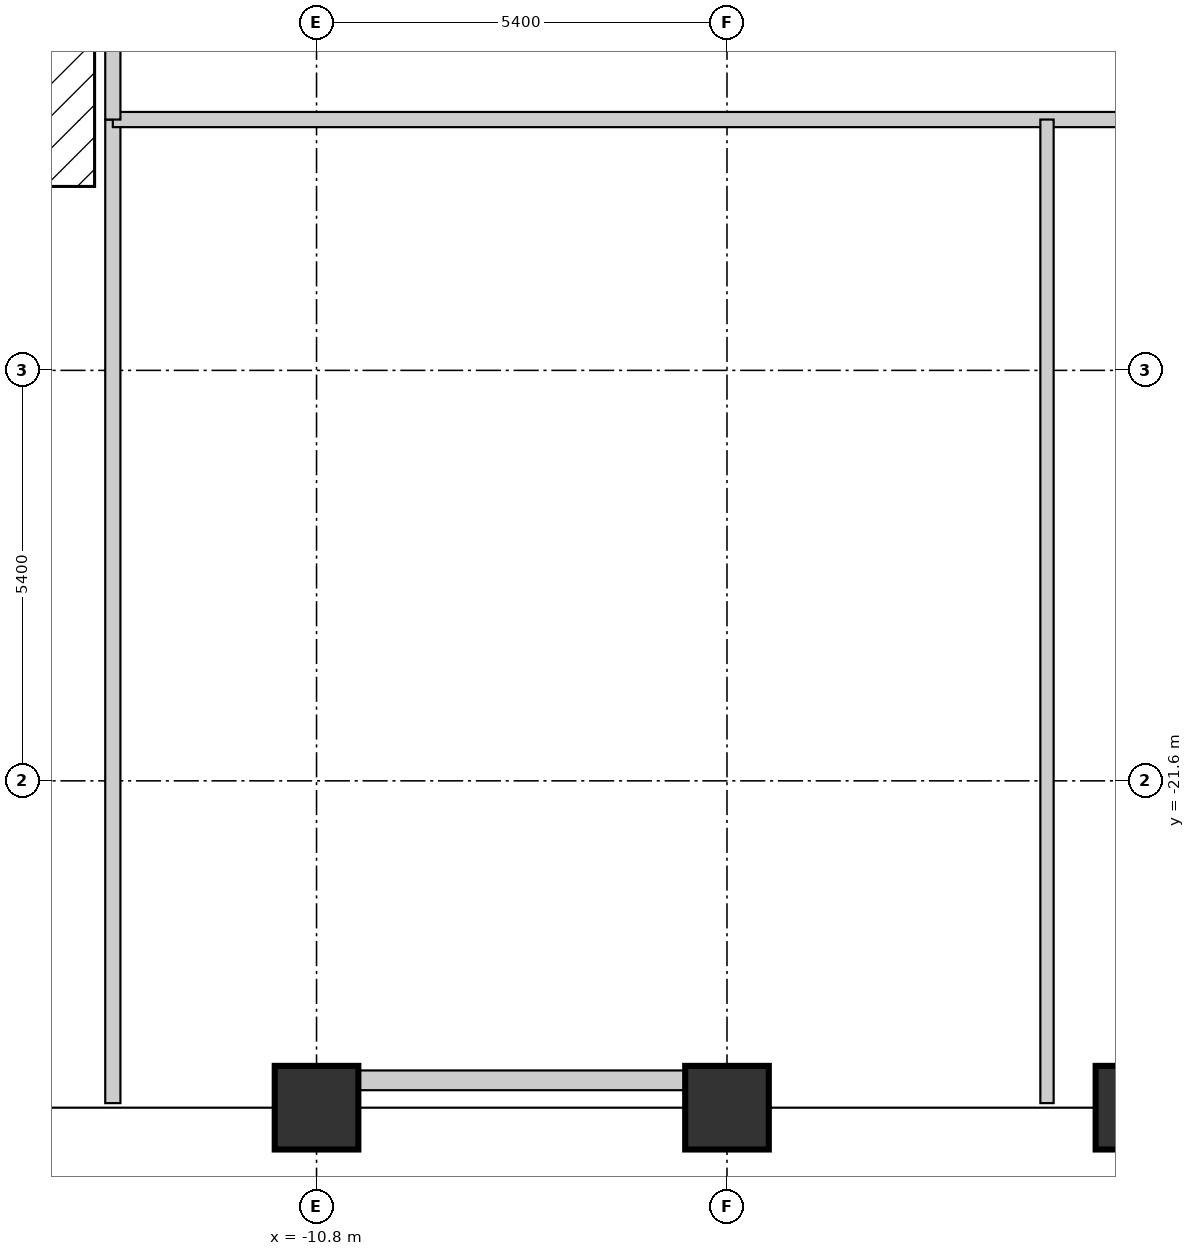
"""IFC4 building model, lengths in metres.
Left out: names, types, materials, properties, quantities, classifications, styles, units other than length and angle.
Written with IfcOpenShell. Run it as: python <this file> out.ifc"""

import sys

from ifc_helpers import new_model, si_unit, direction, frame, frame_2d, origin, origin_2d, place, context, subcontext, project, spatial, rectangle, extrude, element, fill, save


model = new_model("IFC4")
c1 = context("Model", 3, precision=1e-05, world=origin(), true_north=direction((0.0, 1.0)))
c2 = subcontext(c1, "Body", "Model", "MODEL_VIEW")
j1 = project(units=[si_unit("LENGTHUNIT", "METRE"), si_unit("PLANEANGLEUNIT", "RADIAN")], contexts=[c1])
p1 = place(None, origin())
s1 = spatial("IfcSite", under=j1, at=p1, CompositionType="ELEMENT")
p2 = place(p1, origin())
s2 = spatial("IfcBuilding", under=s1, at=p2, CompositionType="ELEMENT")
p3 = place(p2, frame((0.0, 0.0, 83.25)))
s3 = spatial("IfcBuildingStorey", under=s2, at=p3, CompositionType="ELEMENT", Elevation=83.25)
for number, where, z_axis, x_axis in (
    (1, (-10.8, -25.9, 0.0), (0.0, 0.0, 1.0), (1.0, 0.0, 0.0)),
    (2, (-5.4, -25.9, 0.0), (0.0, 0.0, 1.0), (1.0, 0.0, 0.0)),
    (3, (0.0, -25.9, 0.0), (0.0, 0.0, 1.0), (1.0, 0.0, 0.0)),
):
    element("IfcColumn", number, at=place(p3, frame(where, z_axis=z_axis, x_axis=x_axis)), inside=s3, PredefinedType="COLUMN", context=c2, shape_type="SweptSolid", body=[
        extrude(rectangle(XDim=1.1, YDim=1.1, at=origin_2d()), origin(), (0.0, 0.0, 1.0), 3.75),
    ])
p4 = place(p3, frame((-10.252, -25.54, 0.0), z_axis=(0.0, 0.0, 1.0), x_axis=(1.0, 0.0, 0.0)))
e4 = element("IfcWall", 4, at=p4, inside=s3, PredefinedType="STANDARD", context=c2, shape_type="SweptSolid", body=[
    extrude(rectangle(XDim=4.304, YDim=0.26, at=frame_2d((2.152, 0.0))), origin(), (0.0, 0.0, 1.0), 2.699),
])
p5 = place(p3, frame((-13.48, -25.84, 0.0), z_axis=(0.0, 0.0, 1.0), x_axis=(0.0, 1.0, 0.0)))
e5 = element("IfcWall", 5, at=p5, inside=s3, PredefinedType="PARTITIONING", context=c2, shape_type="SweptSolid", body=[
    extrude(rectangle(XDim=12.94, YDim=0.2, at=frame_2d((6.47, 0.0))), origin(), (0.0, 0.0, 1.0), 2.699),
])
p6 = place(p3, frame((-13.48, -12.9, 0.0), z_axis=(0.0, 0.0, 1.0), x_axis=(1.0, 0.0, 0.0)))
e6 = element("IfcWall", 6, at=p6, inside=s3, PredefinedType="PARTITIONING", context=c2, shape_type="SweptSolid", body=[
    extrude(rectangle(XDim=24.58, YDim=0.2, at=frame_2d((12.29, 0.0))), origin(), (0.0, 0.0, 1.0), 2.933),
])
p7 = place(p6, frame((5.695, 0.0, 0.0)))
e7 = element("IfcOpeningElement", 7, at=p7, cuts=e6, PredefinedType="OPENING", context=c2, shape_type="SweptSolid", body=[
    extrude(rectangle(XDim=0.85, YDim=2.1, at=frame_2d((0.425, 1.05))), frame((0.0, 0.11, 0.0), z_axis=(0.0, -1.0, 0.0), x_axis=(1.0, 0.0, 0.0)), (0.0, 0.0, 1.0), 0.22),
])
p8 = place(p6, frame((15.794, 0.0, 0.0)))
e8 = element("IfcOpeningElement", 8, at=p8, cuts=e6, PredefinedType="OPENING", context=c2, shape_type="SweptSolid", body=[
    extrude(rectangle(XDim=0.85, YDim=2.1, at=frame_2d((0.425, 1.05))), frame((0.0, 0.11, 0.0), z_axis=(0.0, -1.0, 0.0), x_axis=(1.0, 0.0, 0.0)), (0.0, 0.0, 1.0), 0.22),
])
p9 = place(p3, frame((-13.48, -12.9, 0.0), z_axis=(0.0, 0.0, 1.0), x_axis=(0.0, 1.0, 0.0)))
e9 = element("IfcWall", 9, at=p9, inside=s3, PredefinedType="PARTITIONING", context=c2, shape_type="SweptSolid", body=[
    extrude(rectangle(XDim=25.8, YDim=0.2, at=frame_2d((12.9, 0.0))), origin(), (0.0, 0.0, 1.0), 3.57),
])
p10 = place(p9, frame((1.07, 0.0, 0.0)))
e10 = element("IfcOpeningElement", 10, at=p10, cuts=e9, PredefinedType="OPENING", context=c2, shape_type="SweptSolid", body=[
    extrude(rectangle(XDim=0.95, YDim=2.1, at=frame_2d((0.475, 1.05))), frame((0.0, 0.11, 0.0), z_axis=(0.0, -1.0, 0.0), x_axis=(1.0, 0.0, 0.0)), (0.0, 0.0, 1.0), 0.22),
])
p11 = place(p9, frame((24.205, 0.0, 0.0)))
e11 = element("IfcOpeningElement", 11, at=p11, cuts=e9, PredefinedType="OPENING", context=c2, shape_type="SweptSolid", body=[
    extrude(rectangle(XDim=0.85, YDim=2.1, at=frame_2d((0.425, 1.05))), frame((0.0, 0.11, 0.0), z_axis=(0.0, -1.0, 0.0), x_axis=(1.0, 0.0, 0.0)), (0.0, 0.0, 1.0), 0.22),
])
p12 = place(p9, frame((21.87, 0.0, 0.0)))
e12 = element("IfcOpeningElement", 12, at=p12, cuts=e9, PredefinedType="OPENING", context=c2, shape_type="SweptSolid", body=[
    extrude(rectangle(XDim=0.95, YDim=2.1, at=frame_2d((0.475, 1.05))), frame((0.0, 0.11, 0.0), z_axis=(0.0, -1.0, 0.0), x_axis=(1.0, 0.0, 0.0)), (0.0, 0.0, 1.0), 0.22),
])
p13 = place(p9, frame((4.525, 0.0, 0.0)))
e13 = element("IfcOpeningElement", 13, at=p13, cuts=e9, PredefinedType="OPENING", context=c2, shape_type="SweptSolid", body=[
    extrude(rectangle(XDim=0.95, YDim=2.1, at=frame_2d((0.475, 1.05))), frame((0.0, 0.11, 0.0), z_axis=(0.0, -1.0, 0.0), x_axis=(1.0, 0.0, 0.0)), (0.0, 0.0, 1.0), 0.22),
])
p14 = place(p9, frame((8.7, 0.0, 0.0)))
e14 = element("IfcOpeningElement", 14, at=p14, cuts=e9, PredefinedType="OPENING", context=c2, shape_type="SweptSolid", body=[
    extrude(rectangle(XDim=0.95, YDim=2.1, at=frame_2d((0.475, 1.05))), frame((0.0, 0.11, 0.0), z_axis=(0.0, -1.0, 0.0), x_axis=(1.0, 0.0, 0.0)), (0.0, 0.0, 1.0), 0.22),
])
p15 = place(p9, frame((13.42, 0.0, 0.0)))
e15 = element("IfcOpeningElement", 15, at=p15, cuts=e9, PredefinedType="OPENING", context=c2, shape_type="SweptSolid", body=[
    extrude(rectangle(XDim=0.95, YDim=2.1, at=frame_2d((0.475, 1.05))), frame((0.0, 0.11, 0.0), z_axis=(0.0, -1.0, 0.0), x_axis=(1.0, 0.0, 0.0)), (0.0, 0.0, 1.0), 0.22),
])
p16 = place(p9, frame((18.32, 0.0, 0.0)))
e16 = element("IfcOpeningElement", 16, at=p16, cuts=e9, PredefinedType="OPENING", context=c2, shape_type="SweptSolid", body=[
    extrude(rectangle(XDim=0.95, YDim=2.1, at=frame_2d((0.475, 1.05))), frame((0.0, 0.11, 0.0), z_axis=(0.0, -1.0, 0.0), x_axis=(1.0, 0.0, 0.0)), (0.0, 0.0, 1.0), 0.22),
])
p17 = place(p3, frame((-1.19, -25.84, 0.0), z_axis=(0.0, 0.0, 1.0), x_axis=(0.0, 1.0, 0.0)))
e17 = element("IfcWall", 17, at=p17, inside=s3, PredefinedType="PARTITIONING", context=c2, shape_type="SweptSolid", body=[
    extrude(rectangle(XDim=12.94, YDim=0.175, at=frame_2d((6.47, 0.0))), origin(), (0.0, 0.0, 1.0), 2.699),
])
p18 = place(p7, origin())
e18 = element("IfcDoor", 18, at=p18, inside=s3, OperationType="SINGLE_SWING_LEFT", PredefinedType="DOOR", context=c2, shape_type="SweptSolid", body=[
    extrude(rectangle(XDim=0.85, YDim=2.1, at=frame_2d((0.425, 1.05))), frame((0.0, 0.025, 0.0), z_axis=(0.0, -1.0, 0.0), x_axis=(1.0, 0.0, 0.0)), (0.0, 0.0, 1.0), 0.05),
])
fill(e7, e18)
save(model, sys.argv[1])
